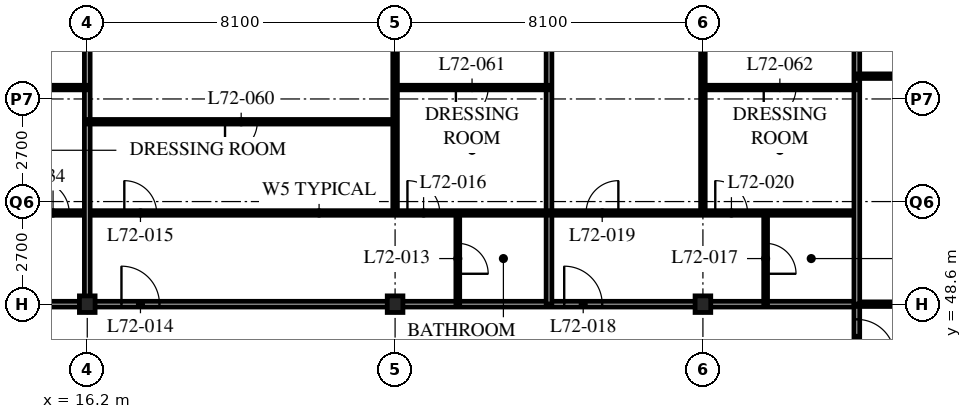
"""IFC4 building model, lengths in metres.
Left out: names, types, materials, properties, quantities, classifications, styles, units other than length and angle.
Written with IfcOpenShell. Run it as: python <this file> out.ifc"""

import sys

from ifc_helpers import new_model, si_unit, direction, frame, frame_2d, origin, origin_2d, place, context, subcontext, project, spatial, rectangle, i_section, extrude, element, fill, save


model = new_model("IFC4")
c1 = context("Model", 3, precision=1e-05, world=origin(), true_north=direction((0.0, 1.0)))
c2 = subcontext(c1, "Body", "Model", "MODEL_VIEW")
j1 = project(units=[si_unit("LENGTHUNIT", "METRE"), si_unit("PLANEANGLEUNIT", "RADIAN")], contexts=[c1])
p1 = place(None, origin())
s1 = spatial("IfcSite", under=j1, at=p1, CompositionType="ELEMENT")
p2 = place(p1, origin())
s2 = spatial("IfcBuilding", under=s1, at=p2, CompositionType="ELEMENT")
p3 = place(p2, frame((0.0, 0.0, 281.4)))
s3 = spatial("IfcBuildingStorey", under=s2, at=p3, CompositionType="ELEMENT", Elevation=281.4)
for number, where, z_axis, x_axis in (
    (1, (16.2, 48.6, 0.0), (0.0, 0.0, 1.0), (1.0, 0.0, 0.0)),
    (2, (24.3, 48.6, 0.0), (0.0, 0.0, 1.0), (1.0, 0.0, 0.0)),
    (3, (32.4, 48.6, 0.0), (0.0, 0.0, 1.0), (1.0, 0.0, 0.0)),
):
    element("IfcColumn", number, at=place(p3, frame(where, z_axis=z_axis, x_axis=x_axis)), inside=s3, PredefinedType="COLUMN", context=c2, shape_type="SweptSolid", body=[
        extrude(i_section(OverallWidth=0.412, OverallDepth=0.437, WebThickness=0.036, FlangeThickness=0.058, FilletRadius=0.015, at=origin_2d()), origin(), (0.0, 0.0, 1.0), 3.9),
    ])
p4 = place(p3, frame((12.15, 48.6, 0.0), z_axis=(0.0, 0.0, 1.0), x_axis=(1.0, 0.0, 0.0)))
e4 = element("IfcWall", 4, at=p4, inside=s3, PredefinedType="PARTITIONING", context=c2, shape_type="SweptSolid", body=[
    extrude(rectangle(XDim=24.3, YDim=0.15, at=frame_2d((12.15, 0.0))), origin(), (0.0, 0.0, 1.0), 3.078),
])
p5 = place(p4, frame((4.95, 0.0, 0.0)))
e5 = element("IfcOpeningElement", 5, at=p5, cuts=e4, PredefinedType="OPENING", context=c2, shape_type="SweptSolid", body=[
    extrude(rectangle(XDim=1.0, YDim=2.1, at=frame_2d((0.5, 1.05))), frame((0.0, 0.085, 0.0), z_axis=(0.0, -1.0, 0.0), x_axis=(1.0, 0.0, 0.0)), (0.0, 0.0, 1.0), 0.17),
])
p6 = place(p4, frame((16.6, 0.0, 0.0)))
e6 = element("IfcOpeningElement", 6, at=p6, cuts=e4, PredefinedType="OPENING", context=c2, shape_type="SweptSolid", body=[
    extrude(rectangle(XDim=1.0, YDim=2.1, at=frame_2d((0.5, 1.05))), frame((0.0, 0.085, 0.0), z_axis=(0.0, -1.0, 0.0), x_axis=(1.0, 0.0, 0.0)), (0.0, 0.0, 1.0), 0.17),
])
p7 = place(p4, frame((1.525, 0.0, 0.0)))
e7 = element("IfcOpeningElement", 7, at=p7, cuts=e4, PredefinedType="OPENING", context=c2, shape_type="SweptSolid", body=[
    extrude(rectangle(XDim=1.0, YDim=2.1, at=frame_2d((0.5, 1.05))), frame((0.0, 0.085, 0.0), z_axis=(0.0, -1.0, 0.0), x_axis=(1.0, 0.0, 0.0)), (0.0, 0.0, 1.0), 0.17),
])
p8 = place(p3, frame((36.45, 46.8, 0.0), z_axis=(0.0, 0.0, 1.0), x_axis=(0.0, 1.0, 0.0)))
e8 = element("IfcWall", 8, at=p8, inside=s3, PredefinedType="PARTITIONING", context=c2, shape_type="SweptSolid", body=[
    extrude(rectangle(XDim=1.8, YDim=0.15, at=frame_2d((0.9, 0.0))), origin(), (0.0, 0.0, 1.0), 3.69),
])
p9 = place(p8, frame((0.4, 0.0, 0.0)))
e9 = element("IfcOpeningElement", 9, at=p9, cuts=e8, PredefinedType="OPENING", context=c2, shape_type="SweptSolid", body=[
    extrude(rectangle(XDim=1.0, YDim=2.1, at=frame_2d((0.5, 1.05))), frame((0.0, 0.085, 0.0), z_axis=(0.0, -1.0, 0.0), x_axis=(1.0, 0.0, 0.0)), (0.0, 0.0, 1.0), 0.17),
])
p10 = place(p3, frame((25.95, 48.6, 0.0), z_axis=(0.0, 0.0, 1.0), x_axis=(0.0, 1.0, 0.0)))
e10 = element("IfcWall", 10, at=p10, inside=s3, PredefinedType="PARTITIONING", context=c2, shape_type="SweptSolid", body=[
    extrude(rectangle(XDim=2.4, YDim=0.1, at=frame_2d((1.2, 0.0))), origin(), (0.0, 0.0, 1.0), 3.69),
])
p11 = place(p10, frame((0.8, 0.0, 0.0)))
e11 = element("IfcOpeningElement", 11, at=p11, cuts=e10, PredefinedType="OPENING", context=c2, shape_type="SweptSolid", body=[
    extrude(rectangle(XDim=0.8, YDim=2.1, at=frame_2d((0.4, 1.05))), frame((0.0, 0.06, 0.0), z_axis=(0.0, -1.0, 0.0), x_axis=(1.0, 0.0, 0.0)), (0.0, 0.0, 1.0), 0.12),
])
p12 = place(p3, frame((24.3, 51.0, 0.0), z_axis=(0.0, 0.0, 1.0), x_axis=(0.0, 1.0, 0.0)))
e12 = element("IfcWall", 12, at=p12, inside=s3, PredefinedType="PARTITIONING", context=c2, shape_type="SweptSolid", body=[
    extrude(rectangle(XDim=13.5, YDim=0.12, at=frame_2d((6.75, 0.0))), origin(), (0.0, 0.0, 1.0), 3.078),
])
p13 = place(p3, frame((28.35, 48.6, 0.0), z_axis=(0.0, 0.0, 1.0), x_axis=(0.0, 1.0, 0.0)))
e13 = element("IfcWall", 13, at=p13, inside=s3, PredefinedType="PARTITIONING", context=c2, shape_type="SweptSolid", body=[
    extrude(rectangle(XDim=15.9, YDim=0.15, at=frame_2d((7.95, 0.0))), origin(), (0.0, 0.0, 1.0), 3.69),
])
p14 = place(p3, frame((34.05, 48.6, 0.0), z_axis=(0.0, 0.0, 1.0), x_axis=(0.0, 1.0, 0.0)))
e14 = element("IfcWall", 14, at=p14, inside=s3, PredefinedType="PARTITIONING", context=c2, shape_type="SweptSolid", body=[
    extrude(rectangle(XDim=2.4, YDim=0.1, at=frame_2d((1.2, 0.0))), origin(), (0.0, 0.0, 1.0), 3.69),
])
p15 = place(p14, frame((0.8, 0.0, 0.0)))
e15 = element("IfcOpeningElement", 15, at=p15, cuts=e14, PredefinedType="OPENING", context=c2, shape_type="SweptSolid", body=[
    extrude(rectangle(XDim=0.8, YDim=2.1, at=frame_2d((0.4, 1.05))), frame((0.0, 0.06, 0.0), z_axis=(0.0, -1.0, 0.0), x_axis=(1.0, 0.0, 0.0)), (0.0, 0.0, 1.0), 0.12),
])
p16 = place(p3, frame((32.4, 51.0, 0.0), z_axis=(0.0, 0.0, 1.0), x_axis=(0.0, 1.0, 0.0)))
e16 = element("IfcWall", 16, at=p16, inside=s3, PredefinedType="PARTITIONING", context=c2, shape_type="SweptSolid", body=[
    extrude(rectangle(XDim=13.5, YDim=0.12, at=frame_2d((6.75, 0.0))), origin(), (0.0, 0.0, 1.0), 3.078),
])
p17 = place(p3, frame((8.15, 51.0, 0.0), z_axis=(0.0, 0.0, 1.0), x_axis=(1.0, 0.0, 0.0)))
e17 = element("IfcWall", 17, at=p17, inside=s3, PredefinedType="PARTITIONING", context=c2, shape_type="SweptSolid", body=[
    extrude(rectangle(XDim=28.3, YDim=0.12, at=frame_2d((14.15, 0.0))), origin(), (0.0, 0.0, 1.0), 3.69),
])
p18 = place(p17, frame((9.025, 0.0, 0.0)))
e18 = element("IfcOpeningElement", 18, at=p18, cuts=e17, PredefinedType="OPENING", context=c2, shape_type="SweptSolid", body=[
    extrude(rectangle(XDim=0.85, YDim=2.1, at=frame_2d((0.425, 1.05))), frame((0.0, 0.07, 0.0), z_axis=(0.0, -1.0, 0.0), x_axis=(1.0, 0.0, 0.0)), (0.0, 0.0, 1.0), 0.14),
])
p19 = place(p17, frame((16.475, 0.0, 0.0)))
e19 = element("IfcOpeningElement", 19, at=p19, cuts=e17, PredefinedType="OPENING", context=c2, shape_type="SweptSolid", body=[
    extrude(rectangle(XDim=0.85, YDim=2.1, at=frame_2d((0.425, 1.05))), frame((0.0, 0.07, 0.0), z_axis=(0.0, -1.0, 0.0), x_axis=(1.0, 0.0, 0.0)), (0.0, 0.0, 1.0), 0.14),
])
p20 = place(p17, frame((21.175, 0.0, 0.0)))
e20 = element("IfcOpeningElement", 20, at=p20, cuts=e17, PredefinedType="OPENING", context=c2, shape_type="SweptSolid", body=[
    extrude(rectangle(XDim=0.85, YDim=2.1, at=frame_2d((0.425, 1.05))), frame((0.0, 0.07, 0.0), z_axis=(0.0, -1.0, 0.0), x_axis=(1.0, 0.0, 0.0)), (0.0, 0.0, 1.0), 0.14),
])
p21 = place(p17, frame((24.575, 0.0, 0.0)))
e21 = element("IfcOpeningElement", 21, at=p21, cuts=e17, PredefinedType="OPENING", context=c2, shape_type="SweptSolid", body=[
    extrude(rectangle(XDim=0.85, YDim=2.1, at=frame_2d((0.425, 1.05))), frame((0.0, 0.07, 0.0), z_axis=(0.0, -1.0, 0.0), x_axis=(1.0, 0.0, 0.0)), (0.0, 0.0, 1.0), 0.14),
])
p22 = place(p17, frame((6.725, 0.0, 0.0)))
e22 = element("IfcOpeningElement", 22, at=p22, cuts=e17, PredefinedType="OPENING", context=c2, shape_type="SweptSolid", body=[
    extrude(rectangle(XDim=0.85, YDim=2.1, at=frame_2d((0.425, 1.05))), frame((0.0, 0.07, 0.0), z_axis=(0.0, -1.0, 0.0), x_axis=(1.0, 0.0, 0.0)), (0.0, 0.0, 1.0), 0.14),
])
p23 = place(p17, frame((2.875, 0.0, 0.0)))
e23 = element("IfcOpeningElement", 23, at=p23, cuts=e17, PredefinedType="OPENING", context=c2, shape_type="SweptSolid", body=[
    extrude(rectangle(XDim=0.85, YDim=2.1, at=frame_2d((0.425, 1.05))), frame((0.0, 0.07, 0.0), z_axis=(0.0, -1.0, 0.0), x_axis=(1.0, 0.0, 0.0)), (0.0, 0.0, 1.0), 0.14),
])
p24 = place(p3, frame((16.2, 48.6, 0.0), z_axis=(0.0, 0.0, 1.0), x_axis=(0.0, 1.0, 0.0)))
e24 = element("IfcWall", 24, at=p24, inside=s3, PredefinedType="PARTITIONING", context=c2, shape_type="SweptSolid", body=[
    extrude(rectangle(XDim=15.9, YDim=0.15, at=frame_2d((7.95, 0.0))), origin(), (0.0, 0.0, 1.0), 3.078),
])
p25 = place(p3, frame((36.45, 48.6, 0.0), z_axis=(0.0, 0.0, 1.0), x_axis=(1.0, 0.0, 0.0)))
e25 = element("IfcWall", 25, at=p25, inside=s3, PredefinedType="PARTITIONING", context=c2, shape_type="SweptSolid", body=[
    extrude(rectangle(XDim=6.45, YDim=0.12, at=frame_2d((3.225, 0.0))), origin(), (0.0, 0.0, 1.0), 3.078),
])
p26 = place(p25, frame((2.3, 0.0, 0.0)))
e26 = element("IfcOpeningElement", 26, at=p26, cuts=e25, PredefinedType="OPENING", context=c2, shape_type="SweptSolid", body=[
    extrude(rectangle(XDim=0.85, YDim=2.1, at=frame_2d((0.425, 1.05))), frame((0.0, 0.07, 0.0), z_axis=(0.0, -1.0, 0.0), x_axis=(1.0, 0.0, 0.0)), (0.0, 0.0, 1.0), 0.14),
])
p27 = place(p3, frame((36.45, 64.5, 0.0), z_axis=(0.0, 0.0, 1.0), x_axis=(0.0, -1.0, 0.0)))
e27 = element("IfcWall", 27, at=p27, inside=s3, PredefinedType="PARTITIONING", context=c2, shape_type="SweptSolid", body=[
    extrude(rectangle(XDim=15.9, YDim=0.15, at=frame_2d((7.95, 0.0))), origin(), (0.0, 0.0, 1.0), 3.69),
])
p28 = place(p3, frame((36.45, 54.6, 0.0), z_axis=(0.0, 0.0, 1.0), x_axis=(1.0, 0.0, 0.0)))
e28 = element("IfcWall", 28, at=p28, inside=s3, PredefinedType="PARTITIONING", context=c2, shape_type="SweptSolid", body=[
    extrude(rectangle(XDim=19.95, YDim=0.12, at=frame_2d((9.975, 0.0))), origin(), (0.0, 0.0, 1.0), 3.69),
])
p29 = place(p28, frame((1.675, 0.0, 0.0)))
e29 = element("IfcOpeningElement", 29, at=p29, cuts=e28, PredefinedType="OPENING", context=c2, shape_type="SweptSolid", body=[
    extrude(rectangle(XDim=0.85, YDim=2.1, at=frame_2d((0.425, 1.05))), frame((0.0, 0.07, 0.0), z_axis=(0.0, -1.0, 0.0), x_axis=(1.0, 0.0, 0.0)), (0.0, 0.0, 1.0), 0.14),
])
p30 = place(p3, frame((16.2, 53.4, 0.0), z_axis=(0.0, 0.0, 1.0), x_axis=(1.0, 0.0, 0.0)))
e30 = element("IfcWall", 30, at=p30, inside=s3, PredefinedType="PARTITIONING", context=c2, shape_type="SweptSolid", body=[
    extrude(rectangle(XDim=8.1, YDim=0.12, at=frame_2d((4.05, 0.0))), origin(), (0.0, 0.0, 1.0), 3.69),
])
p31 = place(p30, frame((3.625, 0.0, 0.0)))
e31 = element("IfcOpeningElement", 31, at=p31, cuts=e30, PredefinedType="OPENING", context=c2, shape_type="SweptSolid", body=[
    extrude(rectangle(XDim=0.85, YDim=2.1, at=frame_2d((0.425, 1.05))), frame((0.0, 0.07, 0.0), z_axis=(0.0, -1.0, 0.0), x_axis=(1.0, 0.0, 0.0)), (0.0, 0.0, 1.0), 0.14),
])
p32 = place(p3, frame((24.3, 54.3, 0.0), z_axis=(0.0, 0.0, 1.0), x_axis=(1.0, 0.0, 0.0)))
e32 = element("IfcWall", 32, at=p32, inside=s3, PredefinedType="PARTITIONING", context=c2, shape_type="SweptSolid", body=[
    extrude(rectangle(XDim=4.05, YDim=0.12, at=frame_2d((2.025, 0.0))), origin(), (0.0, 0.0, 1.0), 3.69),
])
p33 = place(p32, frame((1.6, 0.0, 0.0)))
e33 = element("IfcOpeningElement", 33, at=p33, cuts=e32, PredefinedType="OPENING", context=c2, shape_type="SweptSolid", body=[
    extrude(rectangle(XDim=0.85, YDim=2.1, at=frame_2d((0.425, 1.05))), frame((0.0, 0.07, 0.0), z_axis=(0.0, -1.0, 0.0), x_axis=(1.0, 0.0, 0.0)), (0.0, 0.0, 1.0), 0.14),
])
p34 = place(p3, frame((32.4, 54.3, 0.0), z_axis=(0.0, 0.0, 1.0), x_axis=(1.0, 0.0, 0.0)))
e34 = element("IfcWall", 34, at=p34, inside=s3, PredefinedType="PARTITIONING", context=c2, shape_type="SweptSolid", body=[
    extrude(rectangle(XDim=4.05, YDim=0.12, at=frame_2d((2.025, 0.0))), origin(), (0.0, 0.0, 1.0), 3.69),
])
p35 = place(p34, frame((1.6, 0.0, 0.0)))
e35 = element("IfcOpeningElement", 35, at=p35, cuts=e34, PredefinedType="OPENING", context=c2, shape_type="SweptSolid", body=[
    extrude(rectangle(XDim=0.85, YDim=2.1, at=frame_2d((0.425, 1.05))), frame((0.0, 0.07, 0.0), z_axis=(0.0, -1.0, 0.0), x_axis=(1.0, 0.0, 0.0)), (0.0, 0.0, 1.0), 0.14),
])
p36 = place(p3, frame((12.15, 54.3, 0.0), z_axis=(0.0, 0.0, 1.0), x_axis=(1.0, 0.0, 0.0)))
e36 = element("IfcWall", 36, at=p36, inside=s3, PredefinedType="PARTITIONING", context=c2, shape_type="SweptSolid", body=[
    extrude(rectangle(XDim=4.05, YDim=0.12, at=frame_2d((2.025, 0.0))), origin(), (0.0, 0.0, 1.0), 3.69),
])
p37 = place(p36, frame((1.6, 0.0, 0.0)))
e37 = element("IfcOpeningElement", 37, at=p37, cuts=e36, PredefinedType="OPENING", context=c2, shape_type="SweptSolid", body=[
    extrude(rectangle(XDim=0.85, YDim=2.1, at=frame_2d((0.425, 1.05))), frame((0.0, 0.07, 0.0), z_axis=(0.0, -1.0, 0.0), x_axis=(1.0, 0.0, 0.0)), (0.0, 0.0, 1.0), 0.14),
])
p38 = place(p11, origin())
e38 = element("IfcDoor", 38, at=p38, inside=s3, OperationType="SINGLE_SWING_RIGHT", PredefinedType="DOOR", context=c2, shape_type="SweptSolid", body=[
    extrude(rectangle(XDim=0.8, YDim=2.1, at=frame_2d((0.4, 1.05))), frame((0.0, 0.025, 0.0), z_axis=(0.0, -1.0, 0.0), x_axis=(1.0, 0.0, 0.0)), (0.0, 0.0, 1.0), 0.05),
])
fill(e11, e38)
p39 = place(p5, origin())
e39 = element("IfcDoor", 39, at=p39, inside=s3, OperationType="SINGLE_SWING_LEFT", PredefinedType="DOOR", context=c2, shape_type="SweptSolid", body=[
    extrude(rectangle(XDim=1.0, YDim=2.1, at=frame_2d((0.5, 1.05))), frame((0.0, 0.025, 0.0), z_axis=(0.0, -1.0, 0.0), x_axis=(1.0, 0.0, 0.0)), (0.0, 0.0, 1.0), 0.05),
])
fill(e5, e39)
p40 = place(p18, origin())
e40 = element("IfcDoor", 40, at=p40, inside=s3, OperationType="SINGLE_SWING_LEFT", PredefinedType="DOOR", context=c2, shape_type="SweptSolid", body=[
    extrude(rectangle(XDim=0.85, YDim=2.1, at=frame_2d((0.425, 1.05))), frame((0.0, 0.025, 0.0), z_axis=(0.0, -1.0, 0.0), x_axis=(1.0, 0.0, 0.0)), (0.0, 0.0, 1.0), 0.05),
])
fill(e18, e40)
p41 = place(p19, origin())
e41 = element("IfcDoor", 41, at=p41, inside=s3, OperationType="SINGLE_SWING_LEFT", PredefinedType="DOOR", context=c2, shape_type="SweptSolid", body=[
    extrude(rectangle(XDim=0.85, YDim=2.1, at=frame_2d((0.425, 1.05))), frame((0.0, 0.025, 0.0), z_axis=(0.0, -1.0, 0.0), x_axis=(1.0, 0.0, 0.0)), (0.0, 0.0, 1.0), 0.05),
])
fill(e19, e41)
p42 = place(p15, origin())
e42 = element("IfcDoor", 42, at=p42, inside=s3, OperationType="SINGLE_SWING_RIGHT", PredefinedType="DOOR", context=c2, shape_type="SweptSolid", body=[
    extrude(rectangle(XDim=0.8, YDim=2.1, at=frame_2d((0.4, 1.05))), frame((0.0, 0.025, 0.0), z_axis=(0.0, -1.0, 0.0), x_axis=(1.0, 0.0, 0.0)), (0.0, 0.0, 1.0), 0.05),
])
fill(e15, e42)
p43 = place(p6, origin())
e43 = element("IfcDoor", 43, at=p43, inside=s3, OperationType="SINGLE_SWING_LEFT", PredefinedType="DOOR", context=c2, shape_type="SweptSolid", body=[
    extrude(rectangle(XDim=1.0, YDim=2.1, at=frame_2d((0.5, 1.05))), frame((0.0, 0.025, 0.0), z_axis=(0.0, -1.0, 0.0), x_axis=(1.0, 0.0, 0.0)), (0.0, 0.0, 1.0), 0.05),
])
fill(e6, e43)
p44 = place(p20, origin())
e44 = element("IfcDoor", 44, at=p44, inside=s3, OperationType="SINGLE_SWING_RIGHT", PredefinedType="DOOR", context=c2, shape_type="SweptSolid", body=[
    extrude(rectangle(XDim=0.85, YDim=2.1, at=frame_2d((0.425, 1.05))), frame((0.0, 0.025, 0.0), z_axis=(0.0, -1.0, 0.0), x_axis=(1.0, 0.0, 0.0)), (0.0, 0.0, 1.0), 0.05),
])
fill(e20, e44)
p45 = place(p21, origin())
e45 = element("IfcDoor", 45, at=p45, inside=s3, OperationType="SINGLE_SWING_LEFT", PredefinedType="DOOR", context=c2, shape_type="SweptSolid", body=[
    extrude(rectangle(XDim=0.85, YDim=2.1, at=frame_2d((0.425, 1.05))), frame((0.0, 0.025, 0.0), z_axis=(0.0, -1.0, 0.0), x_axis=(1.0, 0.0, 0.0)), (0.0, 0.0, 1.0), 0.05),
])
fill(e21, e45)
p46 = place(p22, origin())
e46 = element("IfcDoor", 46, at=p46, inside=s3, OperationType="SINGLE_SWING_LEFT", PredefinedType="DOOR", context=c2, shape_type="SweptSolid", body=[
    extrude(rectangle(XDim=0.85, YDim=2.1, at=frame_2d((0.425, 1.05))), frame((0.0, 0.025, 0.0), z_axis=(0.0, -1.0, 0.0), x_axis=(1.0, 0.0, 0.0)), (0.0, 0.0, 1.0), 0.05),
])
fill(e22, e46)
p47 = place(p9, origin())
e47 = element("IfcDoor", 47, at=p47, inside=s3, OperationType="SINGLE_SWING_RIGHT", PredefinedType="DOOR", context=c2, shape_type="SweptSolid", body=[
    extrude(rectangle(XDim=1.0, YDim=2.1, at=frame_2d((0.5, 1.05))), frame((0.0, 0.025, 0.0), z_axis=(0.0, -1.0, 0.0), x_axis=(1.0, 0.0, 0.0)), (0.0, 0.0, 1.0), 0.05),
])
fill(e9, e47)
p48 = place(p31, origin())
e48 = element("IfcDoor", 48, at=p48, inside=s3, OperationType="SINGLE_SWING_RIGHT", PredefinedType="DOOR", context=c2, shape_type="SweptSolid", body=[
    extrude(rectangle(XDim=0.85, YDim=2.1, at=frame_2d((0.425, 1.05))), frame((0.0, 0.025, 0.0), z_axis=(0.0, -1.0, 0.0), x_axis=(1.0, 0.0, 0.0)), (0.0, 0.0, 1.0), 0.05),
])
fill(e31, e48)
p49 = place(p33, origin())
e49 = element("IfcDoor", 49, at=p49, inside=s3, OperationType="SINGLE_SWING_RIGHT", PredefinedType="DOOR", context=c2, shape_type="SweptSolid", body=[
    extrude(rectangle(XDim=0.85, YDim=2.1, at=frame_2d((0.425, 1.05))), frame((0.0, 0.025, 0.0), z_axis=(0.0, -1.0, 0.0), x_axis=(1.0, 0.0, 0.0)), (0.0, 0.0, 1.0), 0.05),
])
fill(e33, e49)
p50 = place(p35, origin())
e50 = element("IfcDoor", 50, at=p50, inside=s3, OperationType="SINGLE_SWING_RIGHT", PredefinedType="DOOR", context=c2, shape_type="SweptSolid", body=[
    extrude(rectangle(XDim=0.85, YDim=2.1, at=frame_2d((0.425, 1.05))), frame((0.0, 0.025, 0.0), z_axis=(0.0, -1.0, 0.0), x_axis=(1.0, 0.0, 0.0)), (0.0, 0.0, 1.0), 0.05),
])
fill(e35, e50)
save(model, sys.argv[1])
